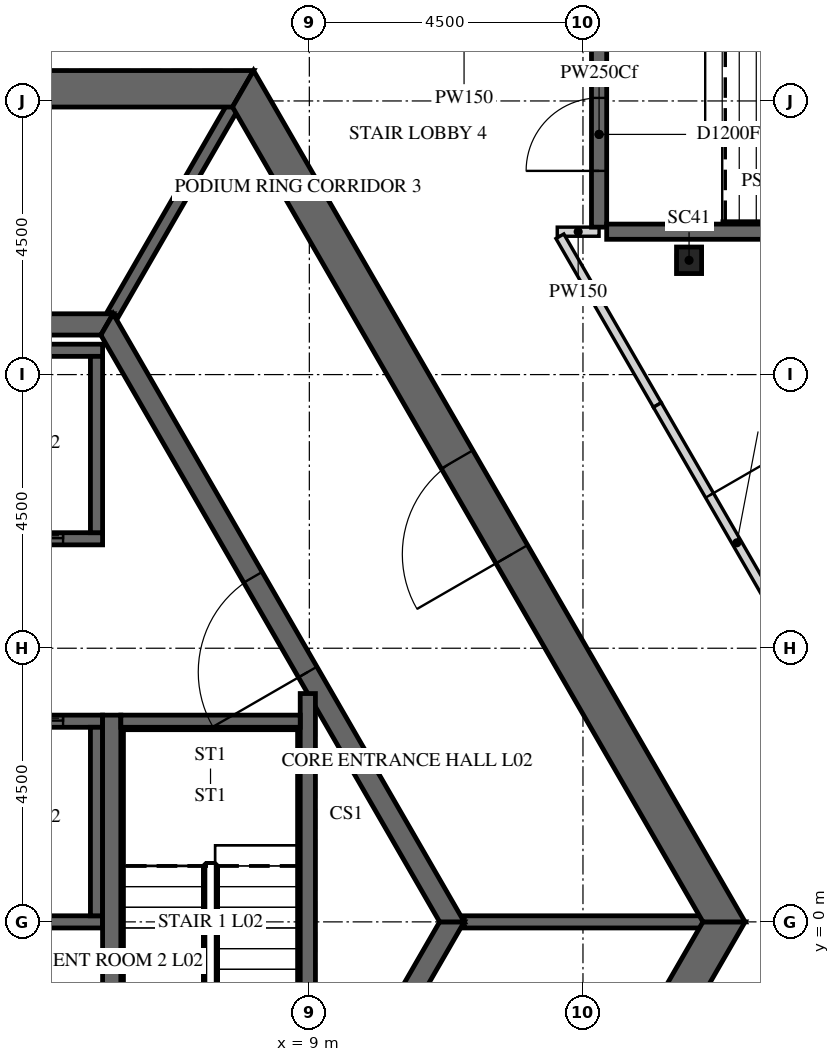
"""IFC4 building model, lengths in metres.
Left out: names, types, materials, properties, quantities, classifications, styles, units other than length and angle.
Written with IfcOpenShell. Run it as: python <this file> out.ifc"""

import sys

from ifc_helpers import new_model, si_unit, direction, frame, frame_2d, origin, origin_2d, place, context, subcontext, project, spatial, polyline, rectangle, i_section, outline, extrude, element, fill, save


model = new_model("IFC4")
c1 = context("Model", 3, precision=1e-05, world=origin(), true_north=direction((0.0, 1.0)))
c2 = subcontext(c1, "Body", "Model", "MODEL_VIEW")
j1 = project(units=[si_unit("LENGTHUNIT", "METRE"), si_unit("PLANEANGLEUNIT", "RADIAN")], contexts=[c1])
p1 = place(None, origin())
s1 = spatial("IfcSite", under=j1, at=p1, CompositionType="ELEMENT")
p2 = place(p1, origin())
s2 = spatial("IfcBuilding", under=s1, at=p2, CompositionType="ELEMENT")
p3 = place(p2, frame((0.0, 0.0, 15.0)))
s3 = spatial("IfcBuildingStorey", under=s2, at=p3, CompositionType="ELEMENT", Elevation=15.0)
p4 = place(p3, frame((15.245, 10.88, -0.25), z_axis=(0.0, 0.0, 1.0), x_axis=(1.0, 0.0, 0.0)))
e1 = element("IfcColumn", 1, at=p4, inside=s3, PredefinedType="COLUMN", context=c2, shape_type="SweptSolid", body=[
    extrude(i_section(OverallWidth=0.412, OverallDepth=0.437, WebThickness=0.036, FlangeThickness=0.058, FilletRadius=0.015, at=origin_2d()), origin(), (0.0, 0.0, 1.0), 5.5),
])
p5 = place(p3, frame((7.91, -13.7, -0.25), z_axis=(0.0, 0.0, 1.0), x_axis=(0.499999880136, 0.866025472988, 0.0)))
e2 = element("IfcWall", 2, at=p5, inside=s3, PredefinedType="SHEAR", context=c2, shape_type="SweptSolid", body=[
    extrude(outline(polyline([(-0.173, -0.3), (15.993, -0.3), (15.646, 0.3), (0.173, 0.3), (-0.173, -0.3)])), origin(), (0.0, 0.0, 1.0), 5.5),
])
p6 = place(p5, frame((7.039, 0.0, 0.25)))
e3 = element("IfcOpeningElement", 3, at=p6, cuts=e2, PredefinedType="OPENING", context=c2, shape_type="SweptSolid", body=[
    extrude(rectangle(XDim=1.8, YDim=2.4, at=frame_2d((0.9, 1.2))), frame((0.0, 0.31, 0.0), z_axis=(0.0, -1.0, 0.0), x_axis=(1.0, 0.0, 0.0)), (0.0, 0.0, 1.0), 0.62),
])
p7 = place(p3, frame((15.819, 0.0, -0.25), z_axis=(0.0, 0.0, 1.0), x_axis=(-0.499999880136, 0.866025472988, 0.0)))
e4 = element("IfcWall", 4, at=p7, inside=s3, PredefinedType="SHEAR", context=c2, shape_type="SweptSolid", body=[
    extrude(outline(polyline([(-0.173, -0.3), (15.993, -0.3), (15.646, 0.3), (0.173, 0.3), (-0.173, -0.3)])), origin(), (0.0, 0.0, 1.0), 5.5),
])
p8 = place(p7, frame((6.981, 0.0, 0.25)))
e5 = element("IfcOpeningElement", 5, at=p8, cuts=e4, PredefinedType="OPENING", context=c2, shape_type="SweptSolid", body=[
    extrude(rectangle(XDim=1.8, YDim=2.4, at=frame_2d((0.9, 1.2))), frame((0.0, 0.31, 0.0), z_axis=(0.0, -1.0, 0.0), x_axis=(1.0, 0.0, 0.0)), (0.0, 0.0, 1.0), 0.62),
])
p9 = place(p3, frame((7.91, 13.7, -0.25), z_axis=(0.0, 0.0, 1.0), x_axis=(-1.0, 0.0, 0.0)))
e6 = element("IfcWall", 6, at=p9, inside=s3, PredefinedType="SHEAR", context=c2, shape_type="SweptSolid", body=[
    extrude(outline(polyline([(-0.173, -0.3), (15.993, -0.3), (15.646, 0.3), (0.173, 0.3), (-0.173, -0.3)])), origin(), (0.0, 0.0, 1.0), 5.5),
])
p10 = place(p9, frame((7.31, 0.0, 0.25)))
e7 = element("IfcOpeningElement", 7, at=p10, cuts=e6, PredefinedType="OPENING", context=c2, shape_type="SweptSolid", body=[
    extrude(rectangle(XDim=1.2, YDim=2.4, at=frame_2d((0.6, 1.2))), frame((0.0, 0.31, 0.0), z_axis=(0.0, -1.0, 0.0), x_axis=(1.0, 0.0, 0.0)), (0.0, 0.0, 1.0), 0.62),
])
p11 = place(p3, frame((5.673, -9.825, -0.25), z_axis=(0.0, 0.0, 1.0), x_axis=(0.499995046907, 0.866028263435, 0.0)))
e8 = element("IfcWall", 8, at=p11, inside=s3, PredefinedType="SHEAR", context=c2, shape_type="SweptSolid", body=[
    extrude(outline(polyline([(-0.101, -0.175), (11.446, -0.175), (11.244, 0.175), (0.101, 0.175), (-0.101, -0.175)])), origin(), (0.0, 0.0, 1.0), 5.5),
])
p12 = place(p11, frame((4.801, 0.0, 0.25)))
e9 = element("IfcOpeningElement", 9, at=p12, cuts=e8, PredefinedType="OPENING", context=c2, shape_type="SweptSolid", body=[
    extrude(rectangle(XDim=1.8, YDim=2.4, at=frame_2d((0.9, 1.2))), frame((0.0, 0.185, 0.0), z_axis=(0.0, -1.0, 0.0), x_axis=(1.0, 0.0, 0.0)), (0.0, 0.0, 1.0), 0.37),
])
p13 = place(p3, frame((11.345, 0.0, -0.25), z_axis=(0.0, 0.0, 1.0), x_axis=(-0.499995046907, 0.866028263435, 0.0)))
e10 = element("IfcWall", 10, at=p13, inside=s3, PredefinedType="SHEAR", context=c2, shape_type="SweptSolid", body=[
    extrude(outline(polyline([(-0.101, -0.175), (11.446, -0.175), (11.244, 0.175), (0.101, 0.175), (-0.101, -0.175)])), origin(), (0.0, 0.0, 1.0), 5.5),
])
p14 = place(p13, frame((4.744, 0.0, 0.25)))
e11 = element("IfcOpeningElement", 11, at=p14, cuts=e10, PredefinedType="OPENING", context=c2, shape_type="SweptSolid", body=[
    extrude(rectangle(XDim=1.8, YDim=2.4, at=frame_2d((0.9, 1.2))), frame((0.0, 0.185, 0.0), z_axis=(0.0, -1.0, 0.0), x_axis=(1.0, 0.0, 0.0)), (0.0, 0.0, 1.0), 0.37),
])
p15 = place(p3, frame((5.673, 9.825, -0.25), z_axis=(0.0, 0.0, 1.0), x_axis=(-1.0, 0.0, 0.0)))
e12 = element("IfcWall", 12, at=p15, inside=s3, PredefinedType="SHEAR", context=c2, shape_type="SweptSolid", body=[
    extrude(outline(polyline([(-0.101, -0.175), (11.446, -0.175), (11.244, 0.175), (0.101, 0.175), (-0.101, -0.175)])), origin(), (0.0, 0.0, 1.0), 5.5),
])
p16 = place(p3, frame((-5.6, 6.3, -0.25), z_axis=(0.0, 0.0, 1.0), x_axis=(1.0, 0.0, 0.0)))
e13 = element("IfcWall", 13, at=p16, inside=s3, PredefinedType="SHEAR", context=c2, shape_type="SweptSolid", body=[
    extrude(rectangle(XDim=11.2, YDim=0.2, at=frame_2d((5.6, 0.0))), origin(), (0.0, 0.0, 1.0), 5.5),
])
p17 = place(p16, frame((0.65, 0.0, 0.25)))
e14 = element("IfcOpeningElement", 14, at=p17, cuts=e13, PredefinedType="OPENING", context=c2, shape_type="SweptSolid", body=[
    extrude(rectangle(XDim=1.1, YDim=2.1, at=frame_2d((0.55, 1.05))), frame((0.0, 0.11, 0.0), z_axis=(0.0, -1.0, 0.0), x_axis=(1.0, 0.0, 0.0)), (0.0, 0.0, 1.0), 0.22),
])
p18 = place(p16, frame((2.85, 0.0, 0.25)))
e15 = element("IfcOpeningElement", 15, at=p18, cuts=e13, PredefinedType="OPENING", context=c2, shape_type="SweptSolid", body=[
    extrude(rectangle(XDim=1.1, YDim=2.1, at=frame_2d((0.55, 1.05))), frame((0.0, 0.11, 0.0), z_axis=(0.0, -1.0, 0.0), x_axis=(1.0, 0.0, 0.0)), (0.0, 0.0, 1.0), 0.22),
])
p19 = place(p16, frame((5.05, 0.0, 0.25)))
e16 = element("IfcOpeningElement", 16, at=p19, cuts=e13, PredefinedType="OPENING", context=c2, shape_type="SweptSolid", body=[
    extrude(rectangle(XDim=1.1, YDim=2.1, at=frame_2d((0.55, 1.05))), frame((0.0, 0.11, 0.0), z_axis=(0.0, -1.0, 0.0), x_axis=(1.0, 0.0, 0.0)), (0.0, 0.0, 1.0), 0.22),
])
p20 = place(p16, frame((7.25, 0.0, 0.25)))
e17 = element("IfcOpeningElement", 17, at=p20, cuts=e13, PredefinedType="OPENING", context=c2, shape_type="SweptSolid", body=[
    extrude(rectangle(XDim=1.1, YDim=2.1, at=frame_2d((0.55, 1.05))), frame((0.0, 0.11, 0.0), z_axis=(0.0, -1.0, 0.0), x_axis=(1.0, 0.0, 0.0)), (0.0, 0.0, 1.0), 0.22),
])
p21 = place(p16, frame((9.45, 0.0, 0.25)))
e18 = element("IfcOpeningElement", 18, at=p21, cuts=e13, PredefinedType="OPENING", context=c2, shape_type="SweptSolid", body=[
    extrude(rectangle(XDim=1.1, YDim=2.1, at=frame_2d((0.55, 1.05))), frame((0.0, 0.11, 0.0), z_axis=(0.0, -1.0, 0.0), x_axis=(1.0, 0.0, 0.0)), (0.0, 0.0, 1.0), 0.22),
])
p22 = place(p3, frame((-5.6, 9.4, -0.25), z_axis=(0.0, 0.0, 1.0), x_axis=(1.0, 0.0, 0.0)))
e19 = element("IfcWall", 19, at=p22, inside=s3, PredefinedType="SHEAR", context=c2, shape_type="SweptSolid", body=[
    extrude(rectangle(XDim=11.2, YDim=0.2, at=frame_2d((5.6, 0.0))), origin(), (0.0, 0.0, 1.0), 5.5),
])
p23 = place(p3, frame((5.5, 6.4, -0.25), z_axis=(0.0, 0.0, 1.0), x_axis=(0.0, 1.0, 0.0)))
e20 = element("IfcWall", 20, at=p23, inside=s3, PredefinedType="SHEAR", context=c2, shape_type="SweptSolid", body=[
    extrude(rectangle(XDim=2.9, YDim=0.2, at=frame_2d((1.45, 0.0))), origin(), (0.0, 0.0, 1.0), 5.5),
])
p24 = place(p3, frame((-5.6, 3.3, -0.25), z_axis=(0.0, 0.0, 1.0), x_axis=(1.0, 0.0, 0.0)))
e21 = element("IfcWall", 21, at=p24, inside=s3, PredefinedType="SHEAR", context=c2, shape_type="SweptSolid", body=[
    extrude(rectangle(XDim=11.2, YDim=0.2, at=frame_2d((5.6, 0.0))), origin(), (0.0, 0.0, 1.0), 5.5),
])
p25 = place(p24, frame((0.65, 0.0, 0.25)))
e22 = element("IfcOpeningElement", 22, at=p25, cuts=e21, PredefinedType="OPENING", context=c2, shape_type="SweptSolid", body=[
    extrude(rectangle(XDim=1.1, YDim=2.1, at=frame_2d((0.55, 1.05))), frame((0.0, 0.11, 0.0), z_axis=(0.0, -1.0, 0.0), x_axis=(1.0, 0.0, 0.0)), (0.0, 0.0, 1.0), 0.22),
])
p26 = place(p24, frame((2.85, 0.0, 0.25)))
e23 = element("IfcOpeningElement", 23, at=p26, cuts=e21, PredefinedType="OPENING", context=c2, shape_type="SweptSolid", body=[
    extrude(rectangle(XDim=1.1, YDim=2.1, at=frame_2d((0.55, 1.05))), frame((0.0, 0.11, 0.0), z_axis=(0.0, -1.0, 0.0), x_axis=(1.0, 0.0, 0.0)), (0.0, 0.0, 1.0), 0.22),
])
p27 = place(p24, frame((5.05, 0.0, 0.25)))
e24 = element("IfcOpeningElement", 24, at=p27, cuts=e21, PredefinedType="OPENING", context=c2, shape_type="SweptSolid", body=[
    extrude(rectangle(XDim=1.1, YDim=2.1, at=frame_2d((0.55, 1.05))), frame((0.0, 0.11, 0.0), z_axis=(0.0, -1.0, 0.0), x_axis=(1.0, 0.0, 0.0)), (0.0, 0.0, 1.0), 0.22),
])
p28 = place(p24, frame((7.25, 0.0, 0.25)))
e25 = element("IfcOpeningElement", 25, at=p28, cuts=e21, PredefinedType="OPENING", context=c2, shape_type="SweptSolid", body=[
    extrude(rectangle(XDim=1.1, YDim=2.1, at=frame_2d((0.55, 1.05))), frame((0.0, 0.11, 0.0), z_axis=(0.0, -1.0, 0.0), x_axis=(1.0, 0.0, 0.0)), (0.0, 0.0, 1.0), 0.22),
])
p29 = place(p24, frame((9.45, 0.0, 0.25)))
e26 = element("IfcOpeningElement", 26, at=p29, cuts=e21, PredefinedType="OPENING", context=c2, shape_type="SweptSolid", body=[
    extrude(rectangle(XDim=1.1, YDim=2.1, at=frame_2d((0.55, 1.05))), frame((0.0, 0.11, 0.0), z_axis=(0.0, -1.0, 0.0), x_axis=(1.0, 0.0, 0.0)), (0.0, 0.0, 1.0), 0.22),
])
p30 = place(p3, frame((-5.6, 0.0, -0.25), z_axis=(0.0, 0.0, 1.0), x_axis=(1.0, 0.0, 0.0)))
e27 = element("IfcWall", 27, at=p30, inside=s3, PredefinedType="SHEAR", context=c2, shape_type="SweptSolid", body=[
    extrude(rectangle(XDim=11.2, YDim=0.2, at=frame_2d((5.6, 0.0))), origin(), (0.0, 0.0, 1.0), 5.5),
])
p31 = place(p3, frame((5.5, 0.1, -0.25), z_axis=(0.0, 0.0, 1.0), x_axis=(0.0, 1.0, 0.0)))
e28 = element("IfcWall", 28, at=p31, inside=s3, PredefinedType="SHEAR", context=c2, shape_type="SweptSolid", body=[
    extrude(rectangle(XDim=3.1, YDim=0.2, at=frame_2d((1.55, 0.0))), origin(), (0.0, 0.0, 1.0), 5.5),
])
p32 = place(p3, frame((11.547, 0.0, -0.25), z_axis=(0.0, 0.0, 1.0), x_axis=(1.0, 0.0, 0.0)))
e29 = element("IfcWall", 29, at=p32, inside=s3, PredefinedType="SHEAR", context=c2, shape_type="SweptSolid", body=[
    extrude(rectangle(XDim=3.926, YDim=0.2, at=frame_2d((1.963, 0.0))), origin(), (0.0, 0.0, 1.0), 5.5),
])
p33 = place(p3, frame((5.773, 10.0, -0.25), z_axis=(0.0, 0.0, 1.0), x_axis=(0.500038251005, 0.86600331843, 0.0)))
e30 = element("IfcWall", 30, at=p33, inside=s3, PredefinedType="SHEAR", context=c2, shape_type="SweptSolid", body=[
    extrude(rectangle(XDim=3.926, YDim=0.2, at=frame_2d((1.963, 0.0))), origin(), (0.0, 0.0, 1.0), 5.5),
])
p34 = place(p3, frame((5.75, -3.4, -0.25), z_axis=(0.0, 0.0, 1.0), x_axis=(0.0, 1.0, 0.0)))
e31 = element("IfcWall", 31, at=p34, inside=s3, PredefinedType="SHEAR", context=c2, shape_type="SweptSolid", body=[
    extrude(rectangle(XDim=6.8, YDim=0.3, at=frame_2d((3.4, 0.0))), origin(), (0.0, 0.0, 1.0), 5.5),
])
p35 = place(p3, frame((8.975, -3.755, -0.25), z_axis=(0.0, 0.0, 1.0), x_axis=(0.0, 1.0, 0.0)))
e32 = element("IfcWall", 32, at=p35, inside=s3, PredefinedType="SHEAR", context=c2, shape_type="SweptSolid", body=[
    extrude(rectangle(XDim=7.51, YDim=0.25, at=frame_2d((3.755, 0.0))), origin(), (0.0, 0.0, 1.0), 5.5),
])
p36 = place(p3, frame((5.9, 3.3, -0.25), z_axis=(0.0, 0.0, 1.0), x_axis=(1.0, 0.0, 0.0)))
e33 = element("IfcWall", 33, at=p36, inside=s3, PredefinedType="SHEAR", context=c2, shape_type="SweptSolid", body=[
    extrude(rectangle(XDim=2.95, YDim=0.2, at=frame_2d((1.475, 0.0))), origin(), (0.0, 0.0, 1.0), 5.5),
])
p37 = place(p3, frame((13.765, 11.35, 0.0), z_axis=(0.0, 0.0, 1.0), x_axis=(-1.0, 0.0, 0.0)))
e34 = element("IfcWall", 34, at=p37, inside=s3, PredefinedType="PARTITIONING", context=c2, shape_type="SweptSolid", body=[
    extrude(rectangle(XDim=0.688, YDim=0.15, at=frame_2d((0.344, 0.0))), origin(), (0.0, 0.0, 1.0), 5.25),
])
p38 = place(p3, frame((13.765, 11.425, 0.0), z_axis=(0.0, 0.0, 1.0), x_axis=(0.0, 1.0, 0.0)))
e35 = element("IfcWall", 35, at=p38, inside=s3, PredefinedType="PARTITIONING", context=c2, shape_type="SweptSolid", body=[
    extrude(rectangle(XDim=3.05, YDim=0.25, at=frame_2d((1.525, 0.0))), origin(), (0.0, 0.0, 1.0), 4.496),
])
p39 = place(p38, frame((0.925, 0.0, 0.0)))
e36 = element("IfcOpeningElement", 36, at=p39, cuts=e35, PredefinedType="OPENING", context=c2, shape_type="SweptSolid", body=[
    extrude(rectangle(XDim=1.2, YDim=2.1, at=frame_2d((0.6, 1.05))), frame((0.0, 0.135, 0.0), z_axis=(0.0, -1.0, 0.0), x_axis=(1.0, 0.0, 0.0)), (0.0, 0.0, 1.0), 0.27),
])
p40 = place(p3, frame((14.723, 8.5, 0.0), z_axis=(0.0, 0.0, 1.0), x_axis=(-0.500104956678, 0.865964798538, 0.0)))
e37 = element("IfcWall", 37, at=p40, inside=s3, PredefinedType="PARTITIONING", context=c2, shape_type="SweptSolid", body=[
    extrude(rectangle(XDim=3.204, YDim=0.15, at=frame_2d((1.602, 0.0))), origin(), (0.0, 0.0, 1.0), 5.25),
])
p41 = place(p3, frame((14.723, 8.5, 0.0), z_axis=(0.0, 0.0, 1.0), x_axis=(0.499952654668, -0.866052736899, 0.0)))
e38 = element("IfcWall", 38, at=p41, inside=s3, PredefinedType="PARTITIONING", context=c2, shape_type="SweptSolid", body=[
    extrude(rectangle(XDim=5.233, YDim=0.15, at=frame_2d((2.616, 0.0))), origin(), (0.0, 0.0, 1.0), 5.25),
])
p42 = place(p41, frame((1.716, 0.0, 0.0)))
e39 = element("IfcOpeningElement", 39, at=p42, cuts=e38, PredefinedType="OPENING", context=c2, shape_type="SweptSolid", body=[
    extrude(rectangle(XDim=1.8, YDim=2.1, at=frame_2d((0.9, 1.05))), frame((0.0, 0.085, 0.0), z_axis=(0.0, -1.0, 0.0), x_axis=(1.0, 0.0, 0.0)), (0.0, 0.0, 1.0), 0.17),
])
p43 = place(p3, frame((24.035, 11.35, 0.0), z_axis=(0.0, 0.0, 1.0), x_axis=(-1.0, 0.0, 0.0)))
e40 = element("IfcWall", 40, at=p43, inside=s3, PredefinedType="PARTITIONING", context=c2, shape_type="SweptSolid", body=[
    extrude(rectangle(XDim=10.145, YDim=0.25, at=frame_2d((5.073, 0.0))), origin(), (0.0, 0.0, 1.0), 5.25),
])
p44 = place(p8, origin())
e41 = element("IfcDoor", 41, at=p44, inside=s3, OperationType="DOUBLE_DOOR_SINGLE_SWING", PredefinedType="DOOR", context=c2, shape_type="SweptSolid", body=[
    extrude(rectangle(XDim=1.8, YDim=2.4, at=frame_2d((0.9, 1.2))), frame((0.0, 0.025, 0.0), z_axis=(0.0, -1.0, 0.0), x_axis=(1.0, 0.0, 0.0)), (0.0, 0.0, 1.0), 0.05),
])
fill(e5, e41)
p45 = place(p14, origin())
e42 = element("IfcDoor", 42, at=p45, inside=s3, OperationType="DOUBLE_DOOR_SINGLE_SWING", PredefinedType="DOOR", context=c2, shape_type="SweptSolid", body=[
    extrude(rectangle(XDim=1.8, YDim=2.4, at=frame_2d((0.9, 1.2))), frame((0.0, 0.025, 0.0), z_axis=(0.0, -1.0, 0.0), x_axis=(1.0, 0.0, 0.0)), (0.0, 0.0, 1.0), 0.05),
])
fill(e11, e42)
p46 = place(p21, origin())
e43 = element("IfcDoor", 43, at=p46, inside=s3, OperationType="SLIDING_TO_LEFT", PredefinedType="DOOR", context=c2, shape_type="SweptSolid", body=[
    extrude(rectangle(XDim=1.1, YDim=2.1, at=frame_2d((0.55, 1.05))), frame((0.0, 0.025, 0.0), z_axis=(0.0, -1.0, 0.0), x_axis=(1.0, 0.0, 0.0)), (0.0, 0.0, 1.0), 0.05),
])
fill(e18, e43)
p47 = place(p29, origin())
e44 = element("IfcDoor", 44, at=p47, inside=s3, OperationType="SLIDING_TO_LEFT", PredefinedType="DOOR", context=c2, shape_type="SweptSolid", body=[
    extrude(rectangle(XDim=1.1, YDim=2.1, at=frame_2d((0.55, 1.05))), frame((0.0, 0.025, 0.0), z_axis=(0.0, -1.0, 0.0), x_axis=(1.0, 0.0, 0.0)), (0.0, 0.0, 1.0), 0.05),
])
fill(e26, e44)
p48 = place(p39, origin())
e45 = element("IfcDoor", 45, at=p48, inside=s3, OperationType="SINGLE_SWING_LEFT", PredefinedType="DOOR", context=c2, shape_type="SweptSolid", body=[
    extrude(rectangle(XDim=1.2, YDim=2.1, at=frame_2d((0.6, 1.05))), frame((0.0, 0.025, 0.0), z_axis=(0.0, -1.0, 0.0), x_axis=(1.0, 0.0, 0.0)), (0.0, 0.0, 1.0), 0.05),
])
fill(e36, e45)
p49 = place(p42, origin())
e46 = element("IfcDoor", 46, at=p49, inside=s3, OperationType="DOUBLE_DOOR_SINGLE_SWING", PredefinedType="DOOR", context=c2, shape_type="SweptSolid", body=[
    extrude(rectangle(XDim=1.8, YDim=2.1, at=frame_2d((0.9, 1.05))), frame((0.0, 0.025, 0.0), z_axis=(0.0, -1.0, 0.0), x_axis=(1.0, 0.0, 0.0)), (0.0, 0.0, 1.0), 0.05),
])
fill(e39, e46)
save(model, sys.argv[1])
